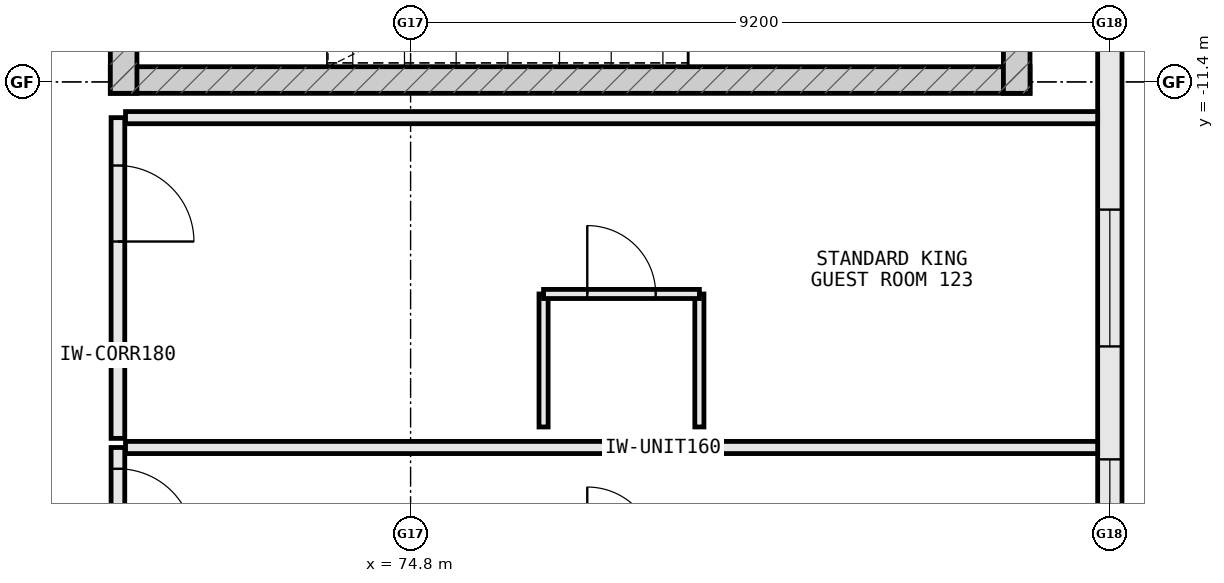
"""IFC4 building model, lengths in metres.
Left out: names, types, materials, properties, quantities, classifications, styles, units other than length and angle.
Written with IfcOpenShell. Run it as: python <this file> out.ifc"""

import sys

from ifc_helpers import new_model, si_unit, direction, frame, frame_2d, origin, place, context, subcontext, project, spatial, rectangle, extrude, element, fill, save


model = new_model("IFC4")
c1 = context("Model", 3, precision=1e-05, world=origin(), true_north=direction((0.0, 1.0)))
c2 = subcontext(c1, "Body", "Model", "MODEL_VIEW")
j1 = project(units=[si_unit("LENGTHUNIT", "METRE"), si_unit("PLANEANGLEUNIT", "RADIAN")], contexts=[c1])
p1 = place(None, origin())
s1 = spatial("IfcSite", under=j1, at=p1, CompositionType="ELEMENT")
p2 = place(p1, origin())
s2 = spatial("IfcBuilding", under=s1, at=p2, CompositionType="ELEMENT")
p3 = place(p2, frame((0.0, 0.0, 20.0)))
s3 = spatial("IfcBuildingStorey", under=s2, at=p3, CompositionType="ELEMENT", Elevation=20.0)
p4 = place(p3, frame((84.0, -18.322, 0.0), z_axis=(0.0, 0.0, 1.0), x_axis=(0.0, 1.0, 0.0)))
e1 = element("IfcWall", 1, at=p4, inside=s3, PredefinedType="STANDARD", context=c2, shape_type="SweptSolid", body=[
    extrude(rectangle(XDim=9.044, YDim=0.32, at=frame_2d((4.522, 0.0))), origin(), (0.0, 0.0, 1.0), 2.965),
])
p5 = place(p4, frame((0.156, 0.0, 0.85)))
e2 = element("IfcOpeningElement", 2, at=p5, cuts=e1, PredefinedType="OPENING", context=c2, shape_type="SweptSolid", body=[
    extrude(rectangle(XDim=1.8, YDim=1.85, at=frame_2d((0.9, 0.925))), frame((0.0, 0.172, 0.0), z_axis=(0.0, -1.0, 0.0), x_axis=(1.0, 0.0, 0.0)), (0.0, 0.0, 1.0), 0.344),
])
p6 = place(p4, frame((3.442, 0.0, 0.85)))
e3 = element("IfcOpeningElement", 3, at=p6, cuts=e1, PredefinedType="OPENING", context=c2, shape_type="SweptSolid", body=[
    extrude(rectangle(XDim=1.8, YDim=1.85, at=frame_2d((0.9, 0.925))), frame((0.0, 0.172, 0.0), z_axis=(0.0, -1.0, 0.0), x_axis=(1.0, 0.0, 0.0)), (0.0, 0.0, 1.0), 0.344),
])
p7 = place(p3, frame((70.85, -11.375, 0.0), z_axis=(0.0, 0.0, 1.0), x_axis=(1.0, 0.0, 0.0)))
e4 = element("IfcWall", 4, at=p7, inside=s3, PredefinedType="SHEAR", context=c2, shape_type="SweptSolid", body=[
    extrude(rectangle(XDim=12.1, YDim=0.35, at=frame_2d((6.05, 0.0))), origin(), (0.0, 0.0, 1.0), 3.8),
])
p8 = place(p3, frame((82.775, -11.55, 0.0), z_axis=(0.0, 0.0, 1.0), x_axis=(0.0, 1.0, 0.0)))
e5 = element("IfcWall", 5, at=p8, inside=s3, PredefinedType="SHEAR", context=c2, shape_type="SweptSolid", body=[
    extrude(rectangle(XDim=5.1, YDim=0.35, at=frame_2d((2.55, 0.0))), origin(), (0.0, 0.0, 1.0), 3.8),
])
p9 = place(p3, frame((71.025, -6.45, 0.0), z_axis=(0.0, 0.0, 1.0), x_axis=(0.0, -1.0, 0.0)))
e6 = element("IfcWall", 6, at=p9, inside=s3, PredefinedType="SHEAR", context=c2, shape_type="SweptSolid", body=[
    extrude(rectangle(XDim=5.1, YDim=0.35, at=frame_2d((2.55, 0.0))), origin(), (0.0, 0.0, 1.0), 3.8),
])
p10 = place(p9, frame((2.0, 0.0, 0.0)))
e7 = element("IfcOpeningElement", 7, at=p10, cuts=e6, PredefinedType="OPENING", context=c2, shape_type="SweptSolid", body=[
    extrude(rectangle(XDim=1.1, YDim=2.2, at=frame_2d((0.55, 1.1))), frame((0.0, 0.187, 0.0), z_axis=(0.0, -1.0, 0.0), x_axis=(1.0, 0.0, 0.0)), (0.0, 0.0, 1.0), 0.374),
])
p11 = place(p3, frame((70.95, -16.21, 0.0), z_axis=(0.0, 0.0, 1.0), x_axis=(0.0, -1.0, 0.0)))
e8 = element("IfcWall", 8, at=p11, inside=s3, PredefinedType="PARTITIONING", context=c2, shape_type="SweptSolid", body=[
    extrude(rectangle(XDim=3.32, YDim=0.18, at=frame_2d((1.66, 0.0))), origin(), (0.0, 0.0, 1.0), 3.55),
])
p12 = place(p11, frame((0.28, 0.0, 0.0)))
e9 = element("IfcOpeningElement", 9, at=p12, cuts=e8, PredefinedType="OPENING", context=c2, shape_type="SweptSolid", body=[
    extrude(rectangle(XDim=1.0, YDim=2.2, at=frame_2d((0.5, 1.1))), frame((0.0, 0.102, 0.0), z_axis=(0.0, -1.0, 0.0), x_axis=(1.0, 0.0, 0.0)), (0.0, 0.0, 1.0), 0.204),
])
p13 = place(p3, frame((71.05, -16.21, 0.0), z_axis=(0.0, 0.0, 1.0), x_axis=(1.0, 0.0, 0.0)))
e10 = element("IfcWall", 10, at=p13, inside=s3, PredefinedType="PARTITIONING", context=c2, shape_type="SweptSolid", body=[
    extrude(rectangle(XDim=12.79, YDim=0.16, at=frame_2d((6.395, 0.0))), origin(), (0.0, 0.0, 1.0), 3.55),
])
p14 = place(p3, frame((70.95, -11.87, 0.0), z_axis=(0.0, 0.0, 1.0), x_axis=(0.0, -1.0, 0.0)))
e11 = element("IfcWall", 11, at=p14, inside=s3, PredefinedType="PARTITIONING", context=c2, shape_type="SweptSolid", body=[
    extrude(rectangle(XDim=4.22, YDim=0.18, at=frame_2d((2.11, 0.0))), origin(), (0.0, 0.0, 1.0), 3.55),
])
p15 = place(p14, frame((0.63, 0.0, 0.0)))
e12 = element("IfcOpeningElement", 12, at=p15, cuts=e11, PredefinedType="OPENING", context=c2, shape_type="SweptSolid", body=[
    extrude(rectangle(XDim=1.0, YDim=2.2, at=frame_2d((0.5, 1.1))), frame((0.0, 0.102, 0.0), z_axis=(0.0, -1.0, 0.0), x_axis=(1.0, 0.0, 0.0)), (0.0, 0.0, 1.0), 0.204),
])
p16 = place(p3, frame((71.05, -11.87, 0.0), z_axis=(0.0, 0.0, 1.0), x_axis=(1.0, 0.0, 0.0)))
e13 = element("IfcWall", 13, at=p16, inside=s3, PredefinedType="PARTITIONING", context=c2, shape_type="SweptSolid", body=[
    extrude(rectangle(XDim=12.79, YDim=0.16, at=frame_2d((6.395, 0.0))), origin(), (0.0, 0.0, 1.0), 3.55),
])
for number, where, z_axis, x_axis in (
    (14, (76.55, -15.94, 0.0), (0.0, 0.0, 1.0), (0.0, 1.0, 0.0)),
    (15, (78.6, -15.94, 0.0), (0.0, 0.0, 1.0), (0.0, 1.0, 0.0)),
):
    element("IfcWall", number, at=place(p3, frame(where, z_axis=z_axis, x_axis=x_axis)), inside=s3, PredefinedType="PARTITIONING", context=c2, shape_type="SweptSolid", body=[
        extrude(rectangle(XDim=1.75, YDim=0.12, at=frame_2d((0.875, 0.0))), origin(), (0.0, 0.0, 1.0), 3.55),
    ])
p17 = place(p3, frame((76.55, -14.19, 0.0), z_axis=(0.0, 0.0, 1.0), x_axis=(1.0, 0.0, 0.0)))
e16 = element("IfcWall", 16, at=p17, inside=s3, PredefinedType="PARTITIONING", context=c2, shape_type="SweptSolid", body=[
    extrude(rectangle(XDim=2.05, YDim=0.12, at=frame_2d((1.025, 0.0))), origin(), (0.0, 0.0, 1.0), 3.55),
])
p18 = place(p17, frame((0.575, 0.0, 0.0)))
e17 = element("IfcOpeningElement", 17, at=p18, cuts=e16, PredefinedType="OPENING", context=c2, shape_type="SweptSolid", body=[
    extrude(rectangle(XDim=0.9, YDim=2.15, at=frame_2d((0.45, 1.075))), frame((0.0, 0.072, 0.0), z_axis=(0.0, -1.0, 0.0), x_axis=(1.0, 0.0, 0.0)), (0.0, 0.0, 1.0), 0.144),
])
p19 = place(p5, origin())
e18 = element("IfcWindow", 18, at=p19, inside=s3, PartitioningType="SINGLE_PANEL", PredefinedType="WINDOW", context=c2, shape_type="SweptSolid", body=[
    extrude(rectangle(XDim=1.8, YDim=1.85, at=frame_2d((0.9, 0.925))), frame((0.0, 0.03, 0.0), z_axis=(0.0, -1.0, 0.0), x_axis=(1.0, 0.0, 0.0)), (0.0, 0.0, 1.0), 0.06),
])
fill(e2, e18)
p20 = place(p6, origin())
e19 = element("IfcWindow", 19, at=p20, inside=s3, PartitioningType="SINGLE_PANEL", PredefinedType="WINDOW", context=c2, shape_type="SweptSolid", body=[
    extrude(rectangle(XDim=1.8, YDim=1.85, at=frame_2d((0.9, 0.925))), frame((0.0, 0.03, 0.0), z_axis=(0.0, -1.0, 0.0), x_axis=(1.0, 0.0, 0.0)), (0.0, 0.0, 1.0), 0.06),
])
fill(e3, e19)
p21 = place(p12, origin())
e20 = element("IfcDoor", 20, at=p21, inside=s3, OperationType="SINGLE_SWING_RIGHT", PredefinedType="DOOR", context=c2, shape_type="SweptSolid", body=[
    extrude(rectangle(XDim=1.0, YDim=2.2, at=frame_2d((0.5, 1.1))), frame((0.0, 0.025, 0.0), z_axis=(0.0, -1.0, 0.0), x_axis=(1.0, 0.0, 0.0)), (0.0, 0.0, 1.0), 0.05),
])
fill(e9, e20)
p22 = place(p15, origin())
e21 = element("IfcDoor", 21, at=p22, inside=s3, OperationType="SINGLE_SWING_RIGHT", PredefinedType="DOOR", context=c2, shape_type="SweptSolid", body=[
    extrude(rectangle(XDim=1.0, YDim=2.2, at=frame_2d((0.5, 1.1))), frame((0.0, 0.025, 0.0), z_axis=(0.0, -1.0, 0.0), x_axis=(1.0, 0.0, 0.0)), (0.0, 0.0, 1.0), 0.05),
])
fill(e12, e21)
p23 = place(p18, origin())
e22 = element("IfcDoor", 22, at=p23, inside=s3, OperationType="SINGLE_SWING_LEFT", PredefinedType="DOOR", context=c2, shape_type="SweptSolid", body=[
    extrude(rectangle(XDim=0.9, YDim=2.15, at=frame_2d((0.45, 1.075))), frame((0.0, 0.025, 0.0), z_axis=(0.0, -1.0, 0.0), x_axis=(1.0, 0.0, 0.0)), (0.0, 0.0, 1.0), 0.05),
])
fill(e17, e22)
save(model, sys.argv[1])
